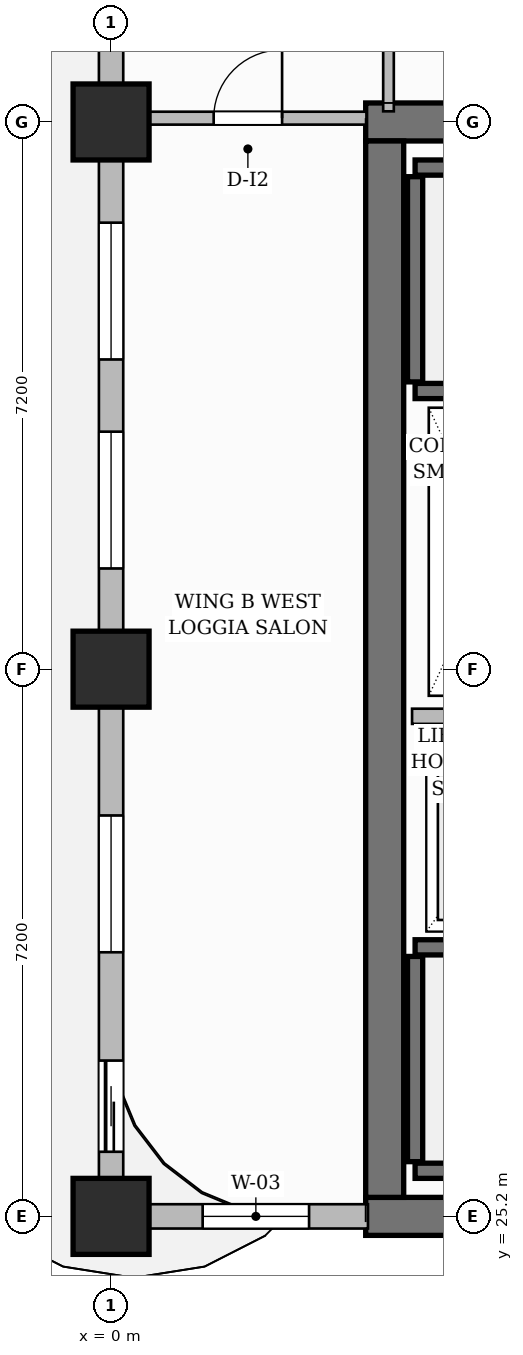
"""IFC4 building model, lengths in metres.
Left out: names, types, materials, properties, quantities, classifications, styles, units other than length and angle.
Written with IfcOpenShell. Run it as: python <this file> out.ifc"""

import sys

from ifc_helpers import new_model, si_unit, direction, frame, frame_2d, origin, origin_2d, place, context, subcontext, project, spatial, rectangle, extrude, source, transform, mapped, element, fill, save


model = new_model("IFC4")
c1 = context("Model", 3, precision=1e-05, world=origin(), true_north=direction((0.0, 1.0)))
c2 = subcontext(c1, "Body", "Model", "MODEL_VIEW")
j1 = project(units=[si_unit("LENGTHUNIT", "METRE"), si_unit("PLANEANGLEUNIT", "RADIAN")], contexts=[c1])
p1 = place(None, origin())
s1 = spatial("IfcSite", under=j1, at=p1, CompositionType="ELEMENT")
p2 = place(p1, origin())
s2 = spatial("IfcBuilding", under=s1, at=p2, CompositionType="ELEMENT")
p3 = place(p2, frame((0.0, 0.0, 177.25)))
s3 = spatial("IfcBuildingStorey", under=s2, at=p3, CompositionType="ELEMENT", Elevation=177.25)
for number, where, z_axis, x_axis in (
    (1, (3.35, 25.2, 0.0), (0.0, 0.0, 1.0), (1.0, 0.0, 0.0)),
    (2, (3.35, 39.6, 0.0), (0.0, 0.0, 1.0), (1.0, 0.0, 0.0)),
):
    element("IfcWall", number, at=place(p3, frame(where, z_axis=z_axis, x_axis=x_axis)), inside=s3, PredefinedType="SHEAR", context=c2, shape_type="SweptSolid", body=[
        extrude(rectangle(XDim=8.3, YDim=0.5, at=frame_2d((4.15, 0.0))), origin(), (0.0, 0.0, 1.0), 3.85),
    ])
p4 = place(p3, frame((3.6, 25.45, 0.0), z_axis=(0.0, 0.0, 1.0), x_axis=(0.0, 1.0, 0.0)))
e3 = element("IfcWall", 3, at=p4, inside=s3, PredefinedType="SHEAR", context=c2, shape_type="SweptSolid", body=[
    extrude(rectangle(XDim=13.9, YDim=0.5, at=frame_2d((6.95, 0.0))), origin(), (0.0, 0.0, 1.0), 3.85),
])
m1 = source(origin(), c2, "Body", "SweptSolid", [
    extrude(rectangle(XDim=1.0, YDim=1.0, at=origin_2d()), origin(), (0.0, 0.0, 1.0), 3.85),
])
for number, where, z_axis, x_axis in (
    (4, (0.0, 25.2, 0.0), (0.0, 0.0, 1.0), (1.0, 0.0, 0.0)),
    (5, (0.0, 32.4, 0.0), (0.0, 0.0, 1.0), (1.0, 0.0, 0.0)),
    (6, (0.0, 39.6, 0.0), (0.0, 0.0, 1.0), (1.0, 0.0, 0.0)),
):
    element("IfcColumn", number, at=place(p3, frame(where, z_axis=z_axis, x_axis=x_axis)), inside=s3, PredefinedType="COLUMN", context=c2, shape_type="MappedRepresentation", body=[
        mapped(m1, transform((0.0, 0.0, 0.0), scale=1.0)),
    ])
p5 = place(p3, frame((4.0, 25.8, 0.0), z_axis=(0.0, 0.0, 1.0), x_axis=(1.0, 0.0, 0.0)))
e7 = element("IfcWall", 7, at=p5, inside=s3, PredefinedType="SHEAR", context=c2, shape_type="SweptSolid", body=[
    extrude(rectangle(XDim=7.1, YDim=0.2, at=frame_2d((3.55, 0.0))), origin(), (0.0, 0.0, 1.0), 3.85),
])
p6 = place(p3, frame((4.0, 25.92, 0.0), z_axis=(0.0, 0.0, 1.0), x_axis=(0.0, 1.0, 0.0)))
e8 = element("IfcWall", 8, at=p6, inside=s3, PredefinedType="SHEAR", context=c2, shape_type="SweptSolid", body=[
    extrude(rectangle(XDim=2.7, YDim=0.2, at=frame_2d((1.35, 0.0))), origin(), (0.0, 0.0, 1.0), 3.85),
])
p7 = place(p3, frame((4.0, 28.74, 0.0), z_axis=(0.0, 0.0, 1.0), x_axis=(1.0, 0.0, 0.0)))
e9 = element("IfcWall", 9, at=p7, inside=s3, PredefinedType="SHEAR", context=c2, shape_type="SweptSolid", body=[
    extrude(rectangle(XDim=7.1, YDim=0.2, at=frame_2d((3.55, 0.0))), origin(), (0.0, 0.0, 1.0), 3.85),
])
p8 = place(p7, frame((5.815, 0.0, 0.0)))
e10 = element("IfcOpeningElement", 10, at=p8, cuts=e9, PredefinedType="OPENING", context=c2, shape_type="SweptSolid", body=[
    extrude(rectangle(XDim=1.05, YDim=2.2, at=frame_2d((0.525, 1.1))), frame((0.0, 0.11, 0.0), z_axis=(0.0, -1.0, 0.0), x_axis=(1.0, 0.0, 0.0)), (0.0, 0.0, 1.0), 0.22),
])
p9 = place(p3, frame((4.0, 39.0, 0.0), z_axis=(0.0, 0.0, 1.0), x_axis=(1.0, 0.0, 0.0)))
e11 = element("IfcWall", 11, at=p9, inside=s3, PredefinedType="SHEAR", context=c2, shape_type="SweptSolid", body=[
    extrude(rectangle(XDim=7.1, YDim=0.2, at=frame_2d((3.55, 0.0))), origin(), (0.0, 0.0, 1.0), 3.85),
])
p10 = place(p3, frame((4.0, 36.18, 0.0), z_axis=(0.0, 0.0, 1.0), x_axis=(0.0, 1.0, 0.0)))
e12 = element("IfcWall", 12, at=p10, inside=s3, PredefinedType="SHEAR", context=c2, shape_type="SweptSolid", body=[
    extrude(rectangle(XDim=2.7, YDim=0.2, at=frame_2d((1.35, 0.0))), origin(), (0.0, 0.0, 1.0), 3.85),
])
p11 = place(p3, frame((4.0, 36.06, 0.0), z_axis=(0.0, 0.0, 1.0), x_axis=(1.0, 0.0, 0.0)))
e13 = element("IfcWall", 13, at=p11, inside=s3, PredefinedType="SHEAR", context=c2, shape_type="SweptSolid", body=[
    extrude(rectangle(XDim=7.1, YDim=0.2, at=frame_2d((3.55, 0.0))), origin(), (0.0, 0.0, 1.0), 3.85),
])
p12 = place(p11, frame((5.815, 0.0, 0.0)))
e14 = element("IfcOpeningElement", 14, at=p12, cuts=e13, PredefinedType="OPENING", context=c2, shape_type="SweptSolid", body=[
    extrude(rectangle(XDim=1.05, YDim=2.2, at=frame_2d((0.525, 1.1))), frame((0.0, 0.11, 0.0), z_axis=(0.0, -1.0, 0.0), x_axis=(1.0, 0.0, 0.0)), (0.0, 0.0, 1.0), 0.22),
])
p13 = place(p3, frame((3.96, 31.78, 0.0), z_axis=(0.0, 0.0, 1.0), x_axis=(1.0, 0.0, 0.0)))
e15 = element("IfcWall", 15, at=p13, inside=s3, PredefinedType="PARTITIONING", context=c2, shape_type="SweptSolid", body=[
    extrude(rectangle(XDim=2.13, YDim=0.2, at=frame_2d((1.065, 0.0))), origin(), (0.0, 0.0, 1.0), 3.6),
])
p14 = place(p3, frame((0.24, 39.65, 0.0), z_axis=(0.0, 0.0, 1.0), x_axis=(1.0, 0.0, 0.0)))
e16 = element("IfcWall", 16, at=p14, inside=s3, PredefinedType="PARTITIONING", context=c2, shape_type="SweptSolid", body=[
    extrude(rectangle(XDim=3.12, YDim=0.17, at=frame_2d((1.56, 0.0))), origin(), (0.0, 0.0, 1.0), 3.6),
])
p15 = place(p14, frame((1.11, 0.0, 0.0)))
e17 = element("IfcOpeningElement", 17, at=p15, cuts=e16, PredefinedType="OPENING", context=c2, shape_type="SweptSolid", body=[
    extrude(rectangle(XDim=0.9, YDim=2.15, at=frame_2d((0.45, 1.075))), frame((0.0, 0.095, 0.0), z_axis=(0.0, -1.0, 0.0), x_axis=(1.0, 0.0, 0.0)), (0.0, 0.0, 1.0), 0.19),
])
p16 = place(p3, frame((3.65, 39.74, 0.0), z_axis=(0.0, 0.0, 1.0), x_axis=(0.0, 1.0, 0.0)))
e18 = element("IfcWall", 18, at=p16, inside=s3, PredefinedType="PARTITIONING", context=c2, shape_type="SweptSolid", body=[
    extrude(rectangle(XDim=1.745, YDim=0.14, at=frame_2d((0.873, 0.0))), origin(), (0.0, 0.0, 1.0), 3.6),
])
p17 = place(p3, frame((0.0, 25.2, 0.0), z_axis=(0.0, 0.0, 1.0), x_axis=(1.0, 0.0, 0.0)))
e19 = element("IfcWall", 19, at=p17, inside=s3, PredefinedType="SOLIDWALL", context=c2, shape_type="SweptSolid", body=[
    extrude(rectangle(XDim=3.38, YDim=0.32, at=frame_2d((1.69, 0.0))), origin(), (0.0, 0.0, 1.0), 3.6),
])
p18 = place(p17, frame((1.205, 0.0, 0.8)))
e20 = element("IfcOpeningElement", 20, at=p18, cuts=e19, PredefinedType="OPENING", context=c2, shape_type="SweptSolid", body=[
    extrude(rectangle(XDim=1.4, YDim=1.85, at=frame_2d((0.7, 0.925))), frame((0.0, 0.17, 0.0), z_axis=(0.0, -1.0, 0.0), x_axis=(1.0, 0.0, 0.0)), (0.0, 0.0, 1.0), 0.34),
])
p19 = place(p3, frame((0.0, 25.25, 0.0), z_axis=(0.0, 0.0, 1.0), x_axis=(0.0, 1.0, 0.0)))
e21 = element("IfcWall", 21, at=p19, inside=s3, PredefinedType="SOLIDWALL", context=c2, shape_type="SweptSolid", body=[
    extrude(rectangle(XDim=21.5, YDim=0.32, at=frame_2d((10.75, 0.0))), origin(), (0.0, 0.0, 1.0), 3.085),
])
p20 = place(p19, frame((18.607, 0.0, 0.0)))
e22 = element("IfcOpeningElement", 22, at=p20, cuts=e21, PredefinedType="OPENING", context=c2, shape_type="SweptSolid", body=[
    extrude(rectangle(XDim=1.2, YDim=2.2, at=frame_2d((0.6, 1.1))), frame((0.0, 0.17, 0.0), z_axis=(0.0, -1.0, 0.0), x_axis=(1.0, 0.0, 0.0)), (0.0, 0.0, 1.0), 0.34),
])
p21 = place(p19, frame((0.8, 0.0, 0.0)))
e23 = element("IfcOpeningElement", 23, at=p21, cuts=e21, PredefinedType="OPENING", context=c2, shape_type="SweptSolid", body=[
    extrude(rectangle(XDim=1.2, YDim=2.2, at=frame_2d((0.6, 1.1))), frame((0.0, 0.17, 0.0), z_axis=(0.0, -1.0, 0.0), x_axis=(1.0, 0.0, 0.0)), (0.0, 0.0, 1.0), 0.34),
])
p22 = place(p19, frame((3.425, 0.0, 0.8)))
e24 = element("IfcOpeningElement", 24, at=p22, cuts=e21, PredefinedType="OPENING", context=c2, shape_type="SweptSolid", body=[
    extrude(rectangle(XDim=1.8, YDim=1.85, at=frame_2d((0.9, 0.925))), frame((0.0, 0.17, 0.0), z_axis=(0.0, -1.0, 0.0), x_axis=(1.0, 0.0, 0.0)), (0.0, 0.0, 1.0), 0.34),
])
p23 = place(p19, frame((8.475, 0.0, 0.8)))
e25 = element("IfcOpeningElement", 25, at=p23, cuts=e21, PredefinedType="OPENING", context=c2, shape_type="SweptSolid", body=[
    extrude(rectangle(XDim=1.8, YDim=1.85, at=frame_2d((0.9, 0.925))), frame((0.0, 0.17, 0.0), z_axis=(0.0, -1.0, 0.0), x_axis=(1.0, 0.0, 0.0)), (0.0, 0.0, 1.0), 0.34),
])
p24 = place(p19, frame((11.225, 0.0, 0.8)))
e26 = element("IfcOpeningElement", 26, at=p24, cuts=e21, PredefinedType="OPENING", context=c2, shape_type="SweptSolid", body=[
    extrude(rectangle(XDim=1.8, YDim=1.85, at=frame_2d((0.9, 0.925))), frame((0.0, 0.17, 0.0), z_axis=(0.0, -1.0, 0.0), x_axis=(1.0, 0.0, 0.0)), (0.0, 0.0, 1.0), 0.34),
])
p25 = place(p19, frame((15.621, 0.0, 0.8)))
e27 = element("IfcOpeningElement", 27, at=p25, cuts=e21, PredefinedType="OPENING", context=c2, shape_type="SweptSolid", body=[
    extrude(rectangle(XDim=1.8, YDim=1.85, at=frame_2d((0.9, 0.925))), frame((0.0, 0.17, 0.0), z_axis=(0.0, -1.0, 0.0), x_axis=(1.0, 0.0, 0.0)), (0.0, 0.0, 1.0), 0.34),
])
m2 = source(origin(), c2, "Body", "SweptSolid", [
    extrude(rectangle(XDim=0.9, YDim=2.15, at=frame_2d((0.45, 1.075))), frame((0.0, 0.025, 0.0), z_axis=(0.0, -1.0, 0.0), x_axis=(1.0, 0.0, 0.0)), (0.0, 0.0, 1.0), 0.05),
])
p26 = place(p15, origin())
e28 = element("IfcDoor", 28, at=p26, inside=s3, OperationType="SINGLE_SWING_RIGHT", PredefinedType="DOOR", context=c2, shape_type="MappedRepresentation", body=[
    mapped(m2, transform((0.0, 0.0, 0.0), scale=1.0)),
])
fill(e17, e28)
m3 = source(origin(), c2, "Body", "SweptSolid", [
    extrude(rectangle(XDim=1.2, YDim=2.2, at=frame_2d((0.6, 1.1))), frame((0.0, 0.025, 0.0), z_axis=(0.0, -1.0, 0.0), x_axis=(1.0, 0.0, 0.0)), (0.0, 0.0, 1.0), 0.05),
])
p27 = place(p21, origin())
e29 = element("IfcDoor", 29, at=p27, inside=s3, OperationType="SLIDING_TO_LEFT", PredefinedType="DOOR", context=c2, shape_type="MappedRepresentation", body=[
    mapped(m3, transform((0.0, 0.0, 0.0), scale=1.0)),
])
fill(e23, e29)
m4 = source(origin(), c2, "Body", "SweptSolid", [
    extrude(rectangle(XDim=1.4, YDim=1.85, at=frame_2d((0.7, 0.925))), frame((0.0, 0.03, 0.0), z_axis=(0.0, -1.0, 0.0), x_axis=(1.0, 0.0, 0.0)), (0.0, 0.0, 1.0), 0.06),
])
p28 = place(p18, origin())
e30 = element("IfcWindow", 30, at=p28, inside=s3, PartitioningType="SINGLE_PANEL", PredefinedType="WINDOW", context=c2, shape_type="MappedRepresentation", body=[
    mapped(m4, transform((0.0, 0.0, 0.0), scale=1.0)),
])
fill(e20, e30)
m5 = source(origin(), c2, "Body", "SweptSolid", [
    extrude(rectangle(XDim=1.8, YDim=1.85, at=frame_2d((0.9, 0.925))), frame((0.0, 0.03, 0.0), z_axis=(0.0, -1.0, 0.0), x_axis=(1.0, 0.0, 0.0)), (0.0, 0.0, 1.0), 0.06),
])
p29 = place(p22, origin())
e31 = element("IfcWindow", 31, at=p29, inside=s3, PartitioningType="DOUBLE_PANEL_VERTICAL", PredefinedType="WINDOW", context=c2, shape_type="MappedRepresentation", body=[
    mapped(m5, transform((0.0, 0.0, 0.0), scale=1.0)),
])
fill(e24, e31)
p30 = place(p23, origin())
e32 = element("IfcWindow", 32, at=p30, inside=s3, PartitioningType="DOUBLE_PANEL_VERTICAL", PredefinedType="WINDOW", context=c2, shape_type="MappedRepresentation", body=[
    mapped(m5, transform((0.0, 0.0, 0.0), scale=1.0)),
])
fill(e25, e32)
p31 = place(p24, origin())
e33 = element("IfcWindow", 33, at=p31, inside=s3, PartitioningType="DOUBLE_PANEL_VERTICAL", PredefinedType="WINDOW", context=c2, shape_type="MappedRepresentation", body=[
    mapped(m5, transform((0.0, 0.0, 0.0), scale=1.0)),
])
fill(e26, e33)
save(model, sys.argv[1])
